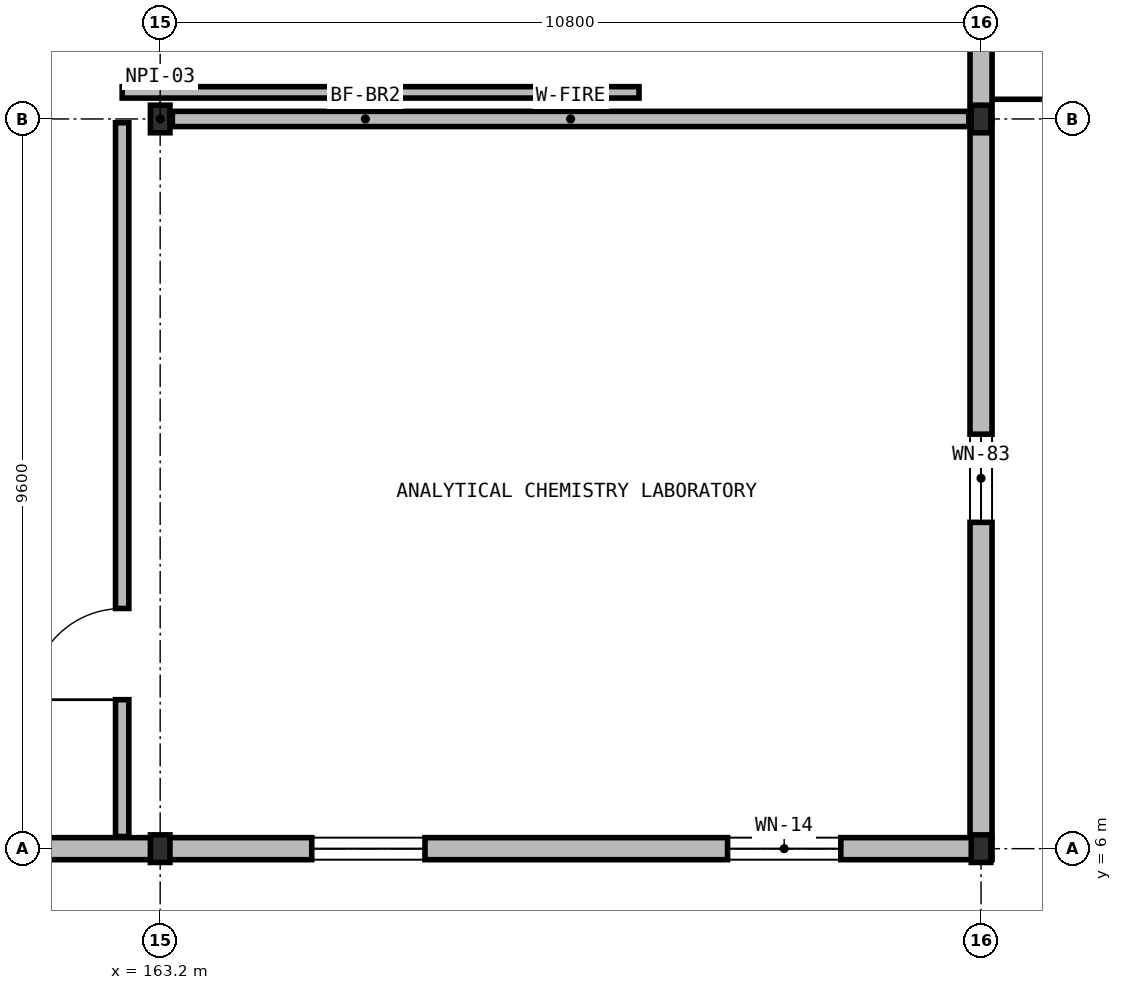
"""IFC4 building model, lengths in metres.
Left out: names, types, materials, properties, quantities, classifications, styles, units other than length and angle.
Written with IfcOpenShell. Run it as: python <this file> out.ifc"""

import sys

from ifc_helpers import new_model, si_unit, direction, frame, frame_2d, origin, origin_2d, place, context, subcontext, project, spatial, rectangle, i_section, extrude, element, fill, save


model = new_model("IFC4")
c1 = context("Model", 3, precision=1e-05, world=origin(), true_north=direction((0.0, 1.0)))
c2 = subcontext(c1, "Body", "Model", "MODEL_VIEW")
j1 = project(units=[si_unit("LENGTHUNIT", "METRE"), si_unit("PLANEANGLEUNIT", "RADIAN")], contexts=[c1])
p1 = place(None, origin())
s1 = spatial("IfcSite", under=j1, at=p1, CompositionType="ELEMENT")
p2 = place(p1, origin())
s2 = spatial("IfcBuilding", under=s1, at=p2, CompositionType="ELEMENT")
p3 = place(p2, frame((0.0, 0.0, 32.55)))
s3 = spatial("IfcBuildingStorey", under=s2, at=p3, CompositionType="ELEMENT", Elevation=32.55)
for number, where, z_axis, x_axis in (
    (1, (163.2, 6.0, 0.0), (0.0, 0.0, 1.0), (1.0, 0.0, 0.0)),
    (2, (163.2, 15.6, 0.0), (0.0, 0.0, 1.0), (1.0, 0.0, 0.0)),
    (3, (174.0, 6.0, 0.0), (0.0, 0.0, 1.0), (1.0, 0.0, 0.0)),
    (4, (174.0, 15.6, 0.0), (0.0, 0.0, 1.0), (1.0, 0.0, 0.0)),
):
    element("IfcColumn", number, at=place(p3, frame(where, z_axis=z_axis, x_axis=x_axis)), inside=s3, PredefinedType="COLUMN", context=c2, shape_type="SweptSolid", body=[
        extrude(i_section(OverallWidth=0.257, OverallDepth=0.363, WebThickness=0.013, FlangeThickness=0.022, at=origin_2d()), origin(), (0.0, 0.0, 1.0), 4.55),
    ])
p4 = place(p3, frame((174.0, 25.196, 0.0), z_axis=(0.0, 0.0, 1.0), x_axis=(0.0, -1.0, 0.0)))
e5 = element("IfcWall", 5, at=p4, inside=s3, PredefinedType="SOLIDWALL", context=c2, shape_type="SweptSolid", body=[
    extrude(rectangle(XDim=9.592, YDim=0.29, at=frame_2d((4.796, 0.0))), origin(), (0.0, 0.0, 1.0), 3.899),
])
p5 = place(p4, frame((3.501, 0.0, 0.95)))
e6 = element("IfcOpeningElement", 6, at=p5, cuts=e5, PredefinedType="OPENING", context=c2, shape_type="SweptSolid", body=[
    extrude(rectangle(XDim=2.59, YDim=1.8, at=frame_2d((1.295, 0.9))), frame((0.0, 0.155, 0.0), z_axis=(0.0, -1.0, 0.0), x_axis=(1.0, 0.0, 0.0)), (0.0, 0.0, 1.0), 0.31),
])
p6 = place(p3, frame((174.0, 15.596, 0.0), z_axis=(0.0, 0.0, 1.0), x_axis=(0.0, -1.0, 0.0)))
e7 = element("IfcWall", 7, at=p6, inside=s3, PredefinedType="SOLIDWALL", context=c2, shape_type="SweptSolid", body=[
    extrude(rectangle(XDim=9.447, YDim=0.29, at=frame_2d((4.724, 0.0))), origin(), (0.0, 0.0, 1.0), 3.899),
])
p7 = place(p6, frame((4.143, 0.0, 0.95)))
e8 = element("IfcOpeningElement", 8, at=p7, cuts=e7, PredefinedType="OPENING", context=c2, shape_type="SweptSolid", body=[
    extrude(rectangle(XDim=1.16, YDim=1.72, at=frame_2d((0.58, 0.86))), frame((0.0, 0.155, 0.0), z_axis=(0.0, -1.0, 0.0), x_axis=(1.0, 0.0, 0.0)), (0.0, 0.0, 1.0), 0.31),
])
p8 = place(p3, frame((174.145, 6.0, 0.0), z_axis=(0.0, 0.0, 1.0), x_axis=(-1.0, 0.0, 0.0)))
e9 = element("IfcWall", 9, at=p8, inside=s3, PredefinedType="SOLIDWALL", context=c2, shape_type="SweptSolid", body=[
    extrude(rectangle(XDim=10.941, YDim=0.29, at=frame_2d((5.47, 0.0))), origin(), (0.0, 0.0, 1.0), 3.83),
])
p9 = place(p8, frame((1.99, 0.0, 0.95)))
e10 = element("IfcOpeningElement", 10, at=p9, cuts=e9, PredefinedType="OPENING", context=c2, shape_type="SweptSolid", body=[
    extrude(rectangle(XDim=1.49, YDim=1.64, at=frame_2d((0.745, 0.82))), frame((0.0, 0.155, 0.0), z_axis=(0.0, -1.0, 0.0), x_axis=(1.0, 0.0, 0.0)), (0.0, 0.0, 1.0), 0.31),
])
p10 = place(p8, frame((7.461, 0.0, 0.95)))
e11 = element("IfcOpeningElement", 11, at=p10, cuts=e9, PredefinedType="OPENING", context=c2, shape_type="SweptSolid", body=[
    extrude(rectangle(XDim=1.49, YDim=1.64, at=frame_2d((0.745, 0.82))), frame((0.0, 0.155, 0.0), z_axis=(0.0, -1.0, 0.0), x_axis=(1.0, 0.0, 0.0)), (0.0, 0.0, 1.0), 0.31),
])
p11 = place(p3, frame((163.196, 6.0, 0.0), z_axis=(0.0, 0.0, 1.0), x_axis=(-1.0, 0.0, 0.0)))
e12 = element("IfcWall", 12, at=p11, inside=s3, PredefinedType="SOLIDWALL", context=c2, shape_type="SweptSolid", body=[
    extrude(rectangle(XDim=9.741, YDim=0.29, at=frame_2d((4.871, 0.0))), origin(), (0.0, 0.0, 1.0), 3.899),
])
p12 = place(p11, frame((6.231, 0.0, 0.95)))
e13 = element("IfcOpeningElement", 13, at=p12, cuts=e12, PredefinedType="OPENING", context=c2, shape_type="SweptSolid", body=[
    extrude(rectangle(XDim=2.15, YDim=1.48, at=frame_2d((1.075, 0.74))), frame((0.0, 0.155, 0.0), z_axis=(0.0, -1.0, 0.0), x_axis=(1.0, 0.0, 0.0)), (0.0, 0.0, 1.0), 0.31),
])
p13 = place(p3, frame((163.36, 15.6, 0.0), z_axis=(0.0, 0.0, 1.0), x_axis=(1.0, 0.0, 0.0)))
e14 = element("IfcWall", 14, at=p13, inside=s3, PredefinedType="SOLIDWALL", context=c2, shape_type="SweptSolid", body=[
    extrude(rectangle(XDim=10.48, YDim=0.2, at=frame_2d((5.24, 0.0))), origin(), (0.0, 0.0, 1.0), 3.753),
])
p14 = place(p3, frame((162.7, 6.16, 0.0), z_axis=(0.0, 0.0, 1.0), x_axis=(0.0, 1.0, 0.0)))
e15 = element("IfcWall", 15, at=p14, inside=s3, PredefinedType="PARTITIONING", context=c2, shape_type="SweptSolid", body=[
    extrude(rectangle(XDim=9.39, YDim=0.175, at=frame_2d((4.695, 0.0))), origin(), (0.0, 0.0, 1.0), 4.3),
])
p15 = place(p14, frame((1.8, 0.0, 0.0)))
e16 = element("IfcOpeningElement", 16, at=p15, cuts=e15, PredefinedType="OPENING", context=c2, shape_type="SweptSolid", body=[
    extrude(rectangle(XDim=1.2, YDim=2.2, at=frame_2d((0.6, 1.1))), frame((0.0, 0.097, 0.0), z_axis=(0.0, -1.0, 0.0), x_axis=(1.0, 0.0, 0.0)), (0.0, 0.0, 1.0), 0.195),
])
p16 = place(p3, frame((162.7, 15.95, 0.0), z_axis=(0.0, 0.0, 1.0), x_axis=(1.0, 0.0, 0.0)))
e17 = element("IfcWall", 17, at=p16, inside=s3, PredefinedType="PARTITIONING", context=c2, shape_type="SweptSolid", body=[
    extrude(rectangle(XDim=6.8, YDim=0.15, at=frame_2d((3.4, 0.0))), origin(), (0.0, 0.0, 1.0), 4.3),
])
p17 = place(p7, origin())
e18 = element("IfcWindow", 18, at=p17, inside=s3, PartitioningType="SINGLE_PANEL", PredefinedType="WINDOW", context=c2, shape_type="SweptSolid", body=[
    extrude(rectangle(XDim=1.16, YDim=1.72, at=frame_2d((0.58, 0.86))), frame((0.0, 0.03, 0.0), z_axis=(0.0, -1.0, 0.0), x_axis=(1.0, 0.0, 0.0)), (0.0, 0.0, 1.0), 0.06),
])
fill(e8, e18)
p18 = place(p9, origin())
e19 = element("IfcWindow", 19, at=p18, inside=s3, PartitioningType="SINGLE_PANEL", PredefinedType="WINDOW", context=c2, shape_type="SweptSolid", body=[
    extrude(rectangle(XDim=1.49, YDim=1.64, at=frame_2d((0.745, 0.82))), frame((0.0, 0.03, 0.0), z_axis=(0.0, -1.0, 0.0), x_axis=(1.0, 0.0, 0.0)), (0.0, 0.0, 1.0), 0.06),
])
fill(e10, e19)
p19 = place(p10, origin())
e20 = element("IfcWindow", 20, at=p19, inside=s3, PartitioningType="SINGLE_PANEL", PredefinedType="WINDOW", context=c2, shape_type="SweptSolid", body=[
    extrude(rectangle(XDim=1.49, YDim=1.64, at=frame_2d((0.745, 0.82))), frame((0.0, 0.03, 0.0), z_axis=(0.0, -1.0, 0.0), x_axis=(1.0, 0.0, 0.0)), (0.0, 0.0, 1.0), 0.06),
])
fill(e11, e20)
p20 = place(p15, origin())
e21 = element("IfcDoor", 21, at=p20, inside=s3, OperationType="SINGLE_SWING_LEFT", PredefinedType="DOOR", context=c2, shape_type="SweptSolid", body=[
    extrude(rectangle(XDim=1.2, YDim=2.2, at=frame_2d((0.6, 1.1))), frame((0.0, 0.025, 0.0), z_axis=(0.0, -1.0, 0.0), x_axis=(1.0, 0.0, 0.0)), (0.0, 0.0, 1.0), 0.05),
])
fill(e16, e21)
save(model, sys.argv[1])
